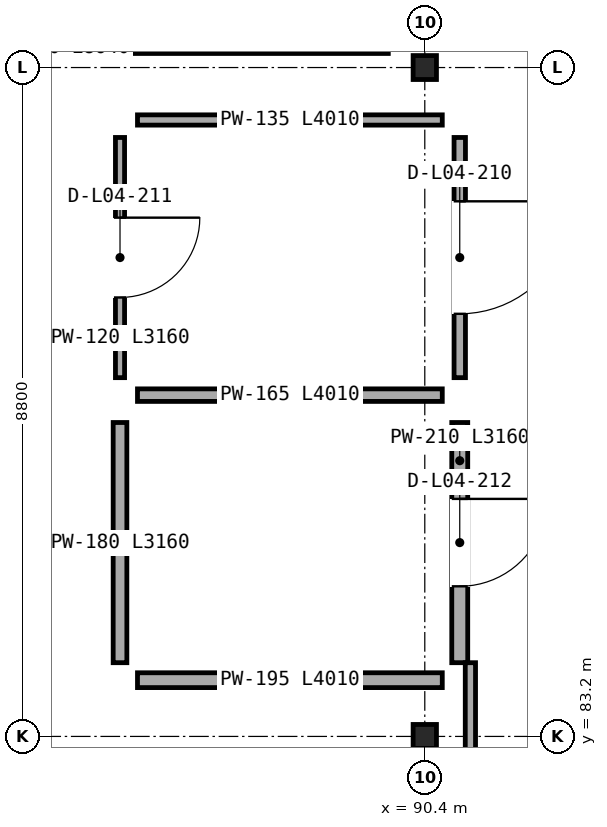
"""IFC4 building model, lengths in metres.
Left out: names, types, materials, properties, quantities, classifications, styles, units other than length and angle.
Written with IfcOpenShell. Run it as: python <this file> out.ifc"""

import sys

from ifc_helpers import new_model, si_unit, direction, frame, frame_2d, origin, origin_2d, place, context, subcontext, project, spatial, rectangle, i_section, extrude, element, fill, save


model = new_model("IFC4")
c1 = context("Model", 3, precision=1e-05, world=origin(), true_north=direction((0.0, 1.0)))
c2 = subcontext(c1, "Body", "Model", "MODEL_VIEW")
j1 = project(units=[si_unit("LENGTHUNIT", "METRE"), si_unit("PLANEANGLEUNIT", "RADIAN")], contexts=[c1])
p1 = place(None, origin())
s1 = spatial("IfcSite", under=j1, at=p1, CompositionType="ELEMENT")
p2 = place(p1, origin())
s2 = spatial("IfcBuilding", under=s1, at=p2, CompositionType="ELEMENT")
p3 = place(p2, frame((0.0, 0.0, 19.1)))
s3 = spatial("IfcBuildingStorey", under=s2, at=p3, CompositionType="ELEMENT", Elevation=19.1)
for number, where, z_axis, x_axis in (
    (1, (90.4, 83.2, 0.0), (0.0, 0.0, 1.0), (1.0, 0.0, 0.0)),
    (2, (90.4, 92.0, 0.0), (0.0, 0.0, 1.0), (1.0, 0.0, 0.0)),
):
    element("IfcColumn", number, at=place(p3, frame(where, z_axis=z_axis, x_axis=x_axis)), inside=s3, PredefinedType="COLUMN", context=c2, shape_type="SweptSolid", body=[
        extrude(i_section(OverallWidth=0.307, OverallDepth=0.315, WebThickness=0.012, FlangeThickness=0.019, FilletRadius=0.017, at=origin_2d()), origin(), (0.0, 0.0, 1.0), 9.0),
    ])
p4 = place(p3, frame((90.63, 87.69, 0.0), z_axis=(0.0, 0.0, 1.0), x_axis=(-1.0, 0.0, 0.0)))
e3 = element("IfcWall", 3, at=p4, inside=s3, PredefinedType="PARTITIONING", context=c2, shape_type="SweptSolid", body=[
    extrude(rectangle(XDim=4.01, YDim=0.165, at=frame_2d((2.005, 0.0))), origin(), (0.0, 0.0, 1.0), 8.263),
])
p5 = place(p3, frame((90.86, 91.08, 0.0), z_axis=(0.0, 0.0, 1.0), x_axis=(0.0, -1.0, 0.0)))
e4 = element("IfcWall", 4, at=p5, inside=s3, PredefinedType="PARTITIONING", context=c2, shape_type="SweptSolid", body=[
    extrude(rectangle(XDim=3.16, YDim=0.15, at=frame_2d((1.58, 0.0))), origin(), (0.0, 0.0, 1.0), 8.264),
])
p6 = place(p5, frame((0.84, 0.0, 0.0)))
e5 = element("IfcOpeningElement", 5, at=p6, cuts=e4, PredefinedType="OPENING", context=c2, shape_type="SweptSolid", body=[
    extrude(rectangle(XDim=1.48, YDim=2.24, at=frame_2d((0.74, 1.12))), frame((0.0, 0.085, 0.0), z_axis=(0.0, -1.0, 0.0), x_axis=(1.0, 0.0, 0.0)), (0.0, 0.0, 1.0), 0.17),
])
p7 = place(p3, frame((86.62, 91.31, 0.0), z_axis=(0.0, 0.0, 1.0), x_axis=(1.0, 0.0, 0.0)))
e6 = element("IfcWall", 6, at=p7, inside=s3, PredefinedType="PARTITIONING", context=c2, shape_type="SweptSolid", body=[
    extrude(rectangle(XDim=4.01, YDim=0.135, at=frame_2d((2.005, 0.0))), origin(), (0.0, 0.0, 1.0), 8.263),
])
p8 = place(p3, frame((86.39, 87.92, 0.0), z_axis=(0.0, 0.0, 1.0), x_axis=(0.0, 1.0, 0.0)))
e7 = element("IfcWall", 7, at=p8, inside=s3, PredefinedType="PARTITIONING", context=c2, shape_type="SweptSolid", body=[
    extrude(rectangle(XDim=3.16, YDim=0.12, at=frame_2d((1.58, 0.0))), origin(), (0.0, 0.0, 1.0), 8.63),
])
p9 = place(p8, frame((1.055, 0.0, 0.0)))
e8 = element("IfcOpeningElement", 8, at=p9, cuts=e7, PredefinedType="OPENING", context=c2, shape_type="SweptSolid", body=[
    extrude(rectangle(XDim=1.05, YDim=2.34, at=frame_2d((0.525, 1.17))), frame((0.0, 0.07, 0.0), z_axis=(0.0, -1.0, 0.0), x_axis=(1.0, 0.0, 0.0)), (0.0, 0.0, 1.0), 0.14),
])
p10 = place(p3, frame((90.86, 87.33, 0.0), z_axis=(0.0, 0.0, 1.0), x_axis=(0.0, -1.0, 0.0)))
e9 = element("IfcWall", 9, at=p10, inside=s3, PredefinedType="PARTITIONING", context=c2, shape_type="SweptSolid", body=[
    extrude(rectangle(XDim=3.16, YDim=0.21, at=frame_2d((1.58, 0.0))), origin(), (0.0, 0.0, 1.0), 8.264),
])
p11 = place(p10, frame((1.005, 0.0, 0.0)))
e10 = element("IfcOpeningElement", 10, at=p11, cuts=e9, PredefinedType="OPENING", context=c2, shape_type="SweptSolid", body=[
    extrude(rectangle(XDim=1.15, YDim=2.34, at=frame_2d((0.575, 1.17))), frame((0.0, 0.115, 0.0), z_axis=(0.0, -1.0, 0.0), x_axis=(1.0, 0.0, 0.0)), (0.0, 0.0, 1.0), 0.23),
])
p12 = place(p3, frame((90.63, 83.94, 0.0), z_axis=(0.0, 0.0, 1.0), x_axis=(-1.0, 0.0, 0.0)))
e11 = element("IfcWall", 11, at=p12, inside=s3, PredefinedType="PARTITIONING", context=c2, shape_type="SweptSolid", body=[
    extrude(rectangle(XDim=4.01, YDim=0.195, at=frame_2d((2.005, 0.0))), origin(), (0.0, 0.0, 1.0), 8.263),
])
p13 = place(p3, frame((86.39, 84.17, 0.0), z_axis=(0.0, 0.0, 1.0), x_axis=(0.0, 1.0, 0.0)))
e12 = element("IfcWall", 12, at=p13, inside=s3, PredefinedType="PARTITIONING", context=c2, shape_type="SweptSolid", body=[
    extrude(rectangle(XDim=3.16, YDim=0.18, at=frame_2d((1.58, 0.0))), origin(), (0.0, 0.0, 1.0), 8.63),
])
p14 = place(p3, frame((81.28, 92.26, 0.0), z_axis=(0.0, 0.0, 1.0), x_axis=(1.0, 0.0, 0.0)))
e13 = element("IfcWall", 13, at=p14, inside=s3, PredefinedType="PARTITIONING", context=c2, shape_type="SweptSolid", body=[
    extrude(rectangle(XDim=8.64, YDim=0.15, at=frame_2d((4.32, 0.0))), origin(), (0.0, 0.0, 1.0), 8.187),
])
p15 = place(p3, frame((91.0, 84.17, 0.0), z_axis=(0.0, 0.0, 1.0), x_axis=(0.0, -1.0, 0.0)))
e14 = element("IfcWall", 14, at=p15, inside=s3, PredefinedType="PARTITIONING", context=c2, shape_type="SweptSolid", body=[
    extrude(rectangle(XDim=4.29, YDim=0.135, at=frame_2d((2.145, 0.0))), origin(), (0.0, 0.0, 1.0), 8.264),
])
p16 = place(p6, origin())
e15 = element("IfcDoor", 15, at=p16, inside=s3, OperationType="SINGLE_SWING_LEFT", PredefinedType="DOOR", context=c2, shape_type="SweptSolid", body=[
    extrude(rectangle(XDim=1.48, YDim=2.24, at=frame_2d((0.74, 1.12))), frame((0.0, 0.025, 0.0), z_axis=(0.0, -1.0, 0.0), x_axis=(1.0, 0.0, 0.0)), (0.0, 0.0, 1.0), 0.05),
])
fill(e5, e15)
p17 = place(p9, frame((1.05, 0.0, 0.0), z_axis=(0.0, 0.0, 1.0), x_axis=(-1.0, 0.0, 0.0)))
e16 = element("IfcDoor", 16, at=p17, inside=s3, OperationType="SINGLE_SWING_RIGHT", PredefinedType="DOOR", context=c2, shape_type="SweptSolid", body=[
    extrude(rectangle(XDim=1.05, YDim=2.34, at=frame_2d((0.525, 1.17))), frame((0.0, 0.025, 0.0), z_axis=(0.0, -1.0, 0.0), x_axis=(1.0, 0.0, 0.0)), (0.0, 0.0, 1.0), 0.05),
])
fill(e8, e16)
p18 = place(p11, origin())
e17 = element("IfcDoor", 17, at=p18, inside=s3, OperationType="SINGLE_SWING_LEFT", PredefinedType="DOOR", context=c2, shape_type="SweptSolid", body=[
    extrude(rectangle(XDim=1.15, YDim=2.34, at=frame_2d((0.575, 1.17))), frame((0.0, 0.025, 0.0), z_axis=(0.0, -1.0, 0.0), x_axis=(1.0, 0.0, 0.0)), (0.0, 0.0, 1.0), 0.05),
])
fill(e10, e17)
save(model, sys.argv[1])
